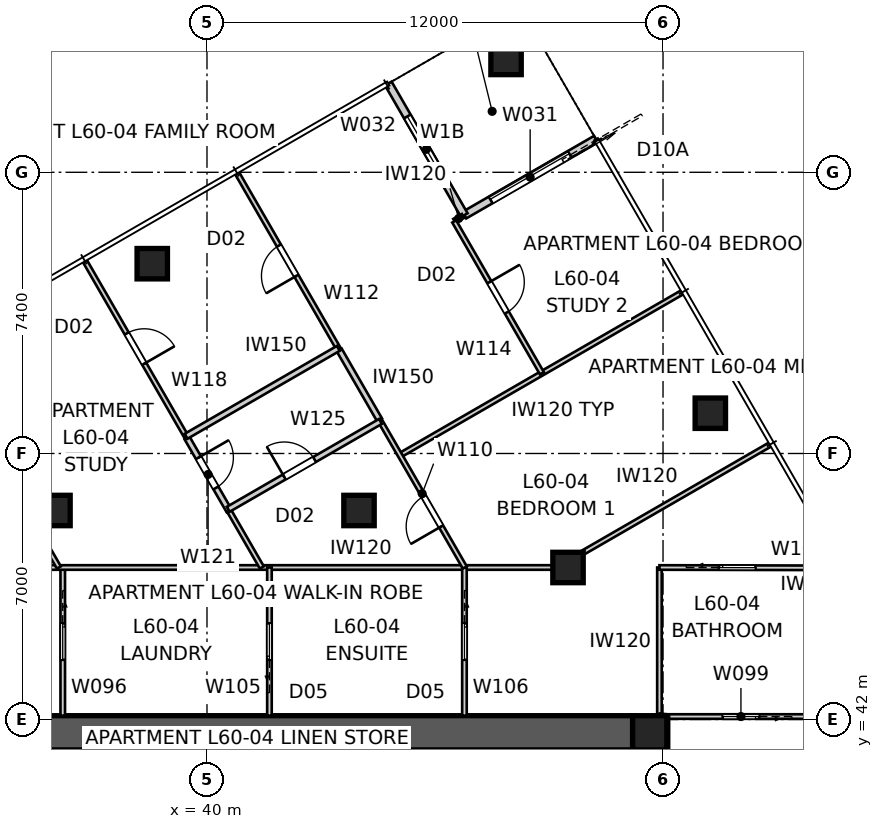
"""IFC4 building model, lengths in metres.
Left out: names, types, materials, properties, quantities, classifications, styles, units other than length and angle.
Written with IfcOpenShell. Run it as: python <this file> out.ifc"""

import sys

from ifc_helpers import new_model, si_unit, direction, frame, frame_2d, origin, origin_2d, place, context, subcontext, project, spatial, polyline, rectangle, outline, extrude, element, fill, save


model = new_model("IFC4")
c1 = context("Model", 3, precision=1e-05, world=origin(), true_north=direction((0.0, 1.0)))
c2 = subcontext(c1, "Body", "Model", "MODEL_VIEW")
j1 = project(units=[si_unit("LENGTHUNIT", "METRE"), si_unit("PLANEANGLEUNIT", "RADIAN")], contexts=[c1])
p1 = place(None, origin())
s1 = spatial("IfcSite", under=j1, at=p1, CompositionType="ELEMENT")
p2 = place(p1, origin())
s2 = spatial("IfcBuilding", under=s1, at=p2, CompositionType="ELEMENT")
p3 = place(p2, frame((0.0, 0.0, 218.4)))
s3 = spatial("IfcBuildingStorey", under=s2, at=p3, CompositionType="ELEMENT", Elevation=218.4)
p4 = place(p3, frame((28.8, 41.65, 0.0), z_axis=(0.0, 0.0, 1.0), x_axis=(1.0, 0.0, 0.0)))
e1 = element("IfcWall", 1, at=p4, inside=s3, PredefinedType="SHEAR", context=c2, shape_type="SweptSolid", body=[
    extrude(outline(polyline([(0.0, -0.45), (22.4, -0.45), (22.4, -0.025), (22.85, -0.025), (22.85, 0.025), (22.4, 0.025), (22.4, 0.45), (0.0, 0.45), (0.0, 0.025), (-0.45, 0.025), (-0.45, -0.025), (0.0, -0.025), (0.0, -0.45)])), origin(), (0.0, 0.0, 1.0), 3.4),
])
p5 = place(p3, frame((51.65, 18.8, 0.0), z_axis=(0.0, 0.0, 1.0), x_axis=(0.0, 1.0, 0.0)))
e2 = element("IfcWall", 2, at=p5, inside=s3, PredefinedType="SHEAR", context=c2, shape_type="SweptSolid", body=[
    extrude(outline(polyline([(0.0, -0.45), (22.4, -0.45), (22.4, -0.025), (22.85, -0.025), (22.85, 0.025), (22.4, 0.025), (22.4, 0.45), (0.0, 0.45), (0.0, 0.025), (-0.45, 0.025), (-0.45, -0.025), (0.0, -0.025), (0.0, -0.45)])), origin(), (0.0, 0.0, 1.0), 3.4),
])
p6 = place(p5, frame((11.14, 0.0, 0.0)))
e3 = element("IfcOpeningElement", 3, at=p6, cuts=e2, PredefinedType="OPENING", context=c2, shape_type="SweptSolid", body=[
    extrude(rectangle(XDim=1.02, YDim=2.4, at=frame_2d((0.51, 1.2))), frame((0.0, 0.46, 0.0), z_axis=(0.0, -1.0, 0.0), x_axis=(1.0, 0.0, 0.0)), (0.0, 0.0, 1.0), 0.92),
])
p7 = place(p3, frame((51.65, 41.65, 0.0), z_axis=(0.0, 0.0, 1.0), x_axis=(1.0, 0.0, 0.0)))
e4 = element("IfcColumn", 4, at=p7, inside=s3, PredefinedType="COLUMN", context=c2, shape_type="SweptSolid", body=[
    extrude(rectangle(XDim=0.9, YDim=0.9, at=origin_2d()), origin(), (0.0, 0.0, 1.0), 3.4),
])
for number, where, z_axis, x_axis in (
    (5, (53.245, 50.06, 0.0), (0.0, 0.0, 1.0), (1.0, 0.0, 0.0)),
    (6, (47.87, 59.37, 0.0), (0.0, 0.0, 1.0), (1.0, 0.0, 0.0)),
    (7, (38.56, 53.995, 0.0), (0.0, 0.0, 1.0), (1.0, 0.0, 0.0)),
    (8, (49.5, 46.0, 0.0), (0.0, 0.0, 1.0), (1.0, 0.0, 0.0)),
    (9, (44.0, 47.5, 0.0), (0.0, 0.0, 1.0), (1.0, 0.0, 0.0)),
    (10, (36.0, 47.5, 0.0), (0.0, 0.0, 1.0), (1.0, 0.0, 0.0)),
):
    element("IfcColumn", number, at=place(p3, frame(where, z_axis=z_axis, x_axis=x_axis)), inside=s3, PredefinedType="COLUMN", context=c2, shape_type="SweptSolid", body=[
        extrude(rectangle(XDim=0.8, YDim=0.8, at=origin_2d()), origin(), (0.0, 0.0, 1.0), 3.4),
    ])
p8 = place(p3, frame((50.236, 57.271, 0.0), z_axis=(0.0, 0.0, 1.0), x_axis=(-0.866026010844, -0.49999894854, 0.0)))
e11 = element("IfcWall", 11, at=p8, inside=s3, PredefinedType="SOLIDWALL", context=c2, shape_type="SweptSolid", body=[
    extrude(rectangle(XDim=4.0, YDim=0.2, at=frame_2d((2.0, 0.0))), origin(), (0.0, 0.0, 1.0), 3.25),
])
p9 = place(p8, frame((0.8, 0.0, 0.0)))
e12 = element("IfcOpeningElement", 12, at=p9, cuts=e11, PredefinedType="OPENING", context=c2, shape_type="SweptSolid", body=[
    extrude(rectangle(XDim=2.4, YDim=2.1, at=frame_2d((1.2, 1.05))), frame((0.0, 0.11, 0.0), z_axis=(0.0, -1.0, 0.0), x_axis=(1.0, 0.0, 0.0)), (0.0, 0.0, 1.0), 0.22),
])
p10 = place(p3, frame((46.771, 55.271, 0.0), z_axis=(0.0, 0.0, 1.0), x_axis=(-0.49999894854, 0.866026010844, 0.0)))
e13 = element("IfcWall", 13, at=p10, inside=s3, PredefinedType="SOLIDWALL", context=c2, shape_type="SweptSolid", body=[
    extrude(rectangle(XDim=4.0, YDim=0.2, at=frame_2d((2.0, 0.0))), origin(), (0.0, 0.0, 1.0), 3.25),
])
p11 = place(p10, frame((1.0, 0.0, 0.45)))
e14 = element("IfcOpeningElement", 14, at=p11, cuts=e13, PredefinedType="OPENING", context=c2, shape_type="SweptSolid", body=[
    extrude(rectangle(XDim=2.0, YDim=1.8, at=frame_2d((1.0, 0.9))), frame((0.0, 0.11, 0.0), z_axis=(0.0, -1.0, 0.0), x_axis=(1.0, 0.0, 0.0)), (0.0, 0.0, 1.0), 0.22),
])
p12 = place(p3, frame((59.486, 41.25, 0.0), z_axis=(0.0, 0.0, 1.0), x_axis=(-0.866020489494, -0.500008511703, 0.0)))
e15 = element("IfcWall", 15, at=p12, inside=s3, PredefinedType="PARTITIONING", context=c2, shape_type="SweptSolid", body=[
    extrude(rectangle(XDim=8.496, YDim=0.25, at=frame_2d((4.248, 0.0))), origin(), (0.0, 0.0, 1.0), 3.25),
])
p13 = place(p3, frame((36.204, 46.0, 0.0), z_axis=(0.0, 0.0, 1.0), x_axis=(0.0, -1.0, 0.0)))
e16 = element("IfcWall", 16, at=p13, inside=s3, PredefinedType="PARTITIONING", context=c2, shape_type="SweptSolid", body=[
    extrude(rectangle(XDim=3.9, YDim=0.12, at=frame_2d((1.95, 0.0))), origin(), (0.0, 0.0, 1.0), 3.25),
])
p14 = place(p13, frame((1.47, 0.0, 0.0)))
e17 = element("IfcOpeningElement", 17, at=p14, cuts=e16, PredefinedType="OPENING", context=c2, shape_type="SweptSolid", body=[
    extrude(rectangle(XDim=0.96, YDim=2.1, at=frame_2d((0.48, 1.05))), frame((0.0, 0.07, 0.0), z_axis=(0.0, -1.0, 0.0), x_axis=(1.0, 0.0, 0.0)), (0.0, 0.0, 1.0), 0.14),
])
p15 = place(p3, frame((32.0, 46.0, 0.0), z_axis=(0.0, 0.0, 1.0), x_axis=(1.0, 0.0, 0.0)))
e18 = element("IfcWall", 18, at=p15, inside=s3, PredefinedType="PARTITIONING", context=c2, shape_type="SweptSolid", body=[
    extrude(rectangle(XDim=17.213, YDim=0.12, at=frame_2d((8.607, 0.0))), origin(), (0.0, 0.0, 1.0), 3.25),
])
p16 = place(p3, frame((56.0, 42.078, 0.0), z_axis=(0.0, 0.0, 1.0), x_axis=(-1.0, 0.0, 0.0)))
e19 = element("IfcWall", 19, at=p16, inside=s3, PredefinedType="PARTITIONING", context=c2, shape_type="SweptSolid", body=[
    extrude(rectangle(XDim=3.9, YDim=0.12, at=frame_2d((1.95, 0.0))), origin(), (0.0, 0.0, 1.0), 3.25),
])
p17 = place(p16, frame((1.47, 0.0, 0.0)))
e20 = element("IfcOpeningElement", 20, at=p17, cuts=e19, PredefinedType="OPENING", context=c2, shape_type="SweptSolid", body=[
    extrude(rectangle(XDim=0.96, YDim=2.1, at=frame_2d((0.48, 1.05))), frame((0.0, 0.07, 0.0), z_axis=(0.0, -1.0, 0.0), x_axis=(1.0, 0.0, 0.0)), (0.0, 0.0, 1.0), 0.14),
])
p18 = place(p3, frame((51.906, 42.1, 0.0), z_axis=(0.0, 0.0, 1.0), x_axis=(0.0, 1.0, 0.0)))
e21 = element("IfcWall", 21, at=p18, inside=s3, PredefinedType="PARTITIONING", context=c2, shape_type="SweptSolid", body=[
    extrude(rectangle(XDim=3.9, YDim=0.12, at=frame_2d((1.95, 0.0))), origin(), (0.0, 0.0, 1.0), 3.25),
])
p19 = place(p3, frame((51.906, 46.0, 0.0), z_axis=(0.0, 0.0, 1.0), x_axis=(0.999997822794, -0.002086721841, 0.0)))
e22 = element("IfcWall", 22, at=p19, inside=s3, PredefinedType="PARTITIONING", context=c2, shape_type="SweptSolid", body=[
    extrude(rectangle(XDim=4.797, YDim=0.12, at=frame_2d((2.398, 0.0))), origin(), (0.0, 0.0, 1.0), 3.25),
])
p20 = place(p19, frame((1.567, 0.0, 0.0)))
e23 = element("IfcOpeningElement", 23, at=p20, cuts=e22, PredefinedType="OPENING", context=c2, shape_type="SweptSolid", body=[
    extrude(rectangle(XDim=0.96, YDim=2.1, at=frame_2d((0.48, 1.05))), frame((0.0, 0.07, 0.0), z_axis=(0.0, -1.0, 0.0), x_axis=(1.0, 0.0, 0.0)), (0.0, 0.0, 1.0), 0.14),
])
p21 = place(p3, frame((52.1, 41.18, 0.0), z_axis=(0.0, 0.0, 1.0), x_axis=(0.0, 1.0, 0.0)))
e24 = element("IfcWall", 24, at=p21, inside=s3, PredefinedType="PARTITIONING", context=c2, shape_type="SweptSolid", body=[
    extrude(rectangle(XDim=0.898, YDim=0.12, at=frame_2d((0.449, 0.0))), origin(), (0.0, 0.0, 1.0), 3.25),
])
p22 = place(p3, frame((41.644, 42.1, 0.0), z_axis=(0.0, 0.0, 1.0), x_axis=(0.0, 1.0, 0.0)))
e25 = element("IfcWall", 25, at=p22, inside=s3, PredefinedType="PARTITIONING", context=c2, shape_type="SweptSolid", body=[
    extrude(rectangle(XDim=3.9, YDim=0.12, at=frame_2d((1.95, 0.0))), origin(), (0.0, 0.0, 1.0), 3.25),
])
p23 = place(p22, frame((1.47, 0.0, 0.0)))
e26 = element("IfcOpeningElement", 26, at=p23, cuts=e25, PredefinedType="OPENING", context=c2, shape_type="SweptSolid", body=[
    extrude(rectangle(XDim=0.96, YDim=2.1, at=frame_2d((0.48, 1.05))), frame((0.0, 0.07, 0.0), z_axis=(0.0, -1.0, 0.0), x_axis=(1.0, 0.0, 0.0)), (0.0, 0.0, 1.0), 0.14),
])
p24 = place(p3, frame((46.775, 46.0, 0.0), z_axis=(0.0, 0.0, 1.0), x_axis=(0.0, -1.0, 0.0)))
e27 = element("IfcWall", 27, at=p24, inside=s3, PredefinedType="PARTITIONING", context=c2, shape_type="SweptSolid", body=[
    extrude(rectangle(XDim=3.9, YDim=0.12, at=frame_2d((1.95, 0.0))), origin(), (0.0, 0.0, 1.0), 3.25),
])
p25 = place(p24, frame((1.47, 0.0, 0.0)))
e28 = element("IfcOpeningElement", 28, at=p25, cuts=e27, PredefinedType="OPENING", context=c2, shape_type="SweptSolid", body=[
    extrude(rectangle(XDim=0.96, YDim=2.1, at=frame_2d((0.48, 1.05))), frame((0.0, 0.07, 0.0), z_axis=(0.0, -1.0, 0.0), x_axis=(1.0, 0.0, 0.0)), (0.0, 0.0, 1.0), 0.14),
])
p26 = place(p3, frame((45.079, 48.954, 0.0), z_axis=(0.0, 0.0, 1.0), x_axis=(0.866025991751, 0.49999898161, 0.0)))
e29 = element("IfcWall", 29, at=p26, inside=s3, PredefinedType="PARTITIONING", context=c2, shape_type="SweptSolid", body=[
    extrude(rectangle(XDim=8.585, YDim=0.12, at=frame_2d((4.292, 0.0))), origin(), (0.0, 0.0, 1.0), 3.25),
])
p27 = place(p3, frame((46.784, 46.0, 0.0), z_axis=(0.0, 0.0, 1.0), x_axis=(-0.500017500808, 0.866015299452, 0.0)))
e30 = element("IfcWall", 30, at=p27, inside=s3, PredefinedType="PARTITIONING", context=c2, shape_type="SweptSolid", body=[
    extrude(rectangle(XDim=4.489, YDim=0.12, at=frame_2d((2.244, 0.0))), origin(), (0.0, 0.0, 1.0), 3.25),
])
p28 = place(p27, frame((1.245, 0.0, 0.0)))
e31 = element("IfcOpeningElement", 31, at=p28, cuts=e30, PredefinedType="OPENING", context=c2, shape_type="SweptSolid", body=[
    extrude(rectangle(XDim=0.92, YDim=2.34, at=frame_2d((0.46, 1.17))), frame((0.0, 0.07, 0.0), z_axis=(0.0, -1.0, 0.0), x_axis=(1.0, 0.0, 0.0)), (0.0, 0.0, 1.0), 0.14),
])
p29 = place(p3, frame((54.826, 49.241, 0.0), z_axis=(0.0, 0.0, 1.0), x_axis=(-0.866023120914, -0.500003954026, 0.0)))
e32 = element("IfcWall", 32, at=p29, inside=s3, PredefinedType="PARTITIONING", context=c2, shape_type="SweptSolid", body=[
    extrude(rectangle(XDim=6.481, YDim=0.12, at=frame_2d((3.241, 0.0))), origin(), (0.0, 0.0, 1.0), 3.25),
])
p30 = place(p3, frame((43.48, 51.722, 0.0), z_axis=(0.0, 0.0, 1.0), x_axis=(-0.499989180974, 0.866031650062, 0.0)))
e33 = element("IfcWall", 33, at=p30, inside=s3, PredefinedType="PARTITIONING", context=c2, shape_type="SweptSolid", body=[
    extrude(rectangle(XDim=5.388, YDim=0.12, at=frame_2d((2.694, 0.0))), origin(), (0.0, 0.0, 1.0), 3.25),
])
p31 = place(p30, frame((2.254, 0.0, 0.0)))
e34 = element("IfcOpeningElement", 34, at=p31, cuts=e33, PredefinedType="OPENING", context=c2, shape_type="SweptSolid", body=[
    extrude(rectangle(XDim=0.92, YDim=2.34, at=frame_2d((0.46, 1.17))), frame((0.0, 0.07, 0.0), z_axis=(0.0, -1.0, 0.0), x_axis=(1.0, 0.0, 0.0)), (0.0, 0.0, 1.0), 0.14),
])
p32 = place(p3, frame((46.737, 55.251, 0.0), z_axis=(0.0, 0.0, 1.0), x_axis=(-0.865829262097, -0.500339573586, 0.0)))
e35 = element("IfcWall", 35, at=p32, inside=s3, PredefinedType="PARTITIONING", context=c2, shape_type="SweptSolid", body=[
    extrude(rectangle(XDim=0.262, YDim=0.12, at=frame_2d((0.131, 0.0))), origin(), (0.0, 0.0, 1.0), 3.25),
])
p33 = place(p3, frame((46.506, 55.107, 0.0), z_axis=(0.0, 0.0, 1.0), x_axis=(0.49996820914, -0.866043757468, 0.0)))
e36 = element("IfcWall", 36, at=p33, inside=s3, PredefinedType="PARTITIONING", context=c2, shape_type="SweptSolid", body=[
    extrude(rectangle(XDim=4.615, YDim=0.12, at=frame_2d((2.308, 0.0))), origin(), (0.0, 0.0, 1.0), 3.25),
])
p34 = place(p33, frame((1.847, 0.0, 0.0)))
e37 = element("IfcOpeningElement", 37, at=p34, cuts=e36, PredefinedType="OPENING", context=c2, shape_type="SweptSolid", body=[
    extrude(rectangle(XDim=0.92, YDim=2.34, at=frame_2d((0.46, 1.17))), frame((0.0, 0.07, 0.0), z_axis=(0.0, -1.0, 0.0), x_axis=(1.0, 0.0, 0.0)), (0.0, 0.0, 1.0), 0.14),
])
p35 = place(p3, frame((44.54, 49.887, 0.0), z_axis=(0.0, 0.0, 1.0), x_axis=(-0.500005013853, 0.866022509016, 0.0)))
e38 = element("IfcWall", 38, at=p35, inside=s3, PredefinedType="SOLIDWALL", context=c2, shape_type="SweptSolid", body=[
    extrude(rectangle(XDim=2.119, YDim=0.15, at=frame_2d((1.06, 0.0))), origin(), (0.0, 0.0, 1.0), 3.25),
])
p36 = place(p3, frame((36.781, 54.076, 0.0), z_axis=(0.0, 0.0, 1.0), x_axis=(0.499989180974, -0.866031650062, 0.0)))
e39 = element("IfcWall", 39, at=p36, inside=s3, PredefinedType="PARTITIONING", context=c2, shape_type="SweptSolid", body=[
    extrude(rectangle(XDim=5.388, YDim=0.12, at=frame_2d((2.694, 0.0))), origin(), (0.0, 0.0, 1.0), 3.25),
])
p37 = place(p36, frame((2.214, 0.0, 0.0)))
e40 = element("IfcOpeningElement", 40, at=p37, cuts=e39, PredefinedType="OPENING", context=c2, shape_type="SweptSolid", body=[
    extrude(rectangle(XDim=0.92, YDim=2.34, at=frame_2d((0.46, 1.17))), frame((0.0, 0.07, 0.0), z_axis=(0.0, -1.0, 0.0), x_axis=(1.0, 0.0, 0.0)), (0.0, 0.0, 1.0), 0.14),
])
p38 = place(p3, frame((36.103, 46.0, 0.0), z_axis=(0.0, 0.0, 1.0), x_axis=(-0.500013541994, 0.866017585169, 0.0)))
e41 = element("IfcWall", 41, at=p38, inside=s3, PredefinedType="PARTITIONING", context=c2, shape_type="SweptSolid", body=[
    extrude(rectangle(XDim=6.655, YDim=0.12, at=frame_2d((3.328, 0.0))), origin(), (0.0, 0.0, 1.0), 3.25),
])
p39 = place(p38, frame((2.887, 0.0, 0.0)))
e42 = element("IfcOpeningElement", 42, at=p39, cuts=e41, PredefinedType="OPENING", context=c2, shape_type="SweptSolid", body=[
    extrude(rectangle(XDim=0.92, YDim=2.34, at=frame_2d((0.46, 1.17))), frame((0.0, 0.07, 0.0), z_axis=(0.0, -1.0, 0.0), x_axis=(1.0, 0.0, 0.0)), (0.0, 0.0, 1.0), 0.14),
])
p40 = place(p3, frame((40.584, 47.488, 0.0), z_axis=(0.0, 0.0, 1.0), x_axis=(0.500005339912, -0.866022320763, 0.0)))
e43 = element("IfcWall", 43, at=p40, inside=s3, PredefinedType="PARTITIONING", context=c2, shape_type="SweptSolid", body=[
    extrude(rectangle(XDim=1.718, YDim=0.12, at=frame_2d((0.859, 0.0))), origin(), (0.0, 0.0, 1.0), 3.25),
])
p41 = place(p3, frame((39.475, 49.41, 0.0), z_axis=(0.0, 0.0, 1.0), x_axis=(0.500008142102, -0.866020702889, 0.0)))
e44 = element("IfcWall", 44, at=p41, inside=s3, PredefinedType="SOLIDWALL", context=c2, shape_type="SweptSolid", body=[
    extrude(rectangle(XDim=2.219, YDim=0.15, at=frame_2d((1.11, 0.0))), origin(), (0.0, 0.0, 1.0), 3.25),
])
p42 = place(p41, frame((0.6, 0.0, 0.0)))
e45 = element("IfcOpeningElement", 45, at=p42, cuts=e44, PredefinedType="OPENING", context=c2, shape_type="SweptSolid", body=[
    extrude(rectangle(XDim=0.92, YDim=2.34, at=frame_2d((0.46, 1.17))), frame((0.0, 0.085, 0.0), z_axis=(0.0, -1.0, 0.0), x_axis=(1.0, 0.0, 0.0)), (0.0, 0.0, 1.0), 0.17),
])
p43 = place(p3, frame((43.455, 51.766, 0.0), z_axis=(0.0, 0.0, 1.0), x_axis=(-0.866025598446, -0.499999662836, 0.0)))
e46 = element("IfcWall", 46, at=p43, inside=s3, PredefinedType="SOLIDWALL", context=c2, shape_type="SweptSolid", body=[
    extrude(rectangle(XDim=4.625, YDim=0.15, at=frame_2d((2.312, 0.0))), origin(), (0.0, 0.0, 1.0), 3.25),
])
p44 = place(p3, frame((40.559, 47.531, 0.0), z_axis=(0.0, 0.0, 1.0), x_axis=(0.866025598446, 0.499999662836, 0.0)))
e47 = element("IfcWall", 47, at=p44, inside=s3, PredefinedType="SOLIDWALL", context=c2, shape_type="SweptSolid", body=[
    extrude(rectangle(XDim=4.625, YDim=0.15, at=frame_2d((2.312, 0.0))), origin(), (0.0, 0.0, 1.0), 3.25),
])
p45 = place(p44, frame((1.702, 0.0, 0.0)))
e48 = element("IfcOpeningElement", 48, at=p45, cuts=e47, PredefinedType="OPENING", context=c2, shape_type="SweptSolid", body=[
    extrude(rectangle(XDim=0.92, YDim=2.34, at=frame_2d((0.46, 1.17))), frame((0.0, 0.085, 0.0), z_axis=(0.0, -1.0, 0.0), x_axis=(1.0, 0.0, 0.0)), (0.0, 0.0, 1.0), 0.17),
])
p46 = place(p3, frame((51.906, 42.1, 0.0), z_axis=(0.0, 0.0, 1.0), x_axis=(0.993387055489, -0.114813579278, 0.0)))
e49 = element("IfcWall", 49, at=p46, inside=s3, PredefinedType="PARTITIONING", context=c2, shape_type="SweptSolid", body=[
    extrude(rectangle(XDim=0.196, YDim=0.12, at=frame_2d((0.098, 0.0))), origin(), (0.0, 0.0, 1.0), 3.25),
])
p47 = place(p9, origin())
e50 = element("IfcDoor", 50, at=p47, inside=s3, OperationType="SLIDING_TO_LEFT", PredefinedType="DOOR", context=c2, shape_type="SweptSolid", body=[
    extrude(rectangle(XDim=2.4, YDim=2.1, at=frame_2d((1.2, 1.05))), frame((0.0, 0.025, 0.0), z_axis=(0.0, -1.0, 0.0), x_axis=(1.0, 0.0, 0.0)), (0.0, 0.0, 1.0), 0.05),
])
fill(e12, e50)
p48 = place(p11, origin())
e51 = element("IfcWindow", 51, at=p48, inside=s3, PartitioningType="SINGLE_PANEL", PredefinedType="WINDOW", context=c2, shape_type="SweptSolid", body=[
    extrude(rectangle(XDim=2.0, YDim=1.8, at=frame_2d((1.0, 0.9))), frame((0.0, 0.03, 0.0), z_axis=(0.0, -1.0, 0.0), x_axis=(1.0, 0.0, 0.0)), (0.0, 0.0, 1.0), 0.06),
])
fill(e14, e51)
p49 = place(p14, origin())
e52 = element("IfcDoor", 52, at=p49, inside=s3, OperationType="SLIDING_TO_LEFT", PredefinedType="DOOR", context=c2, shape_type="SweptSolid", body=[
    extrude(rectangle(XDim=0.96, YDim=2.1, at=frame_2d((0.48, 1.05))), frame((0.0, 0.025, 0.0), z_axis=(0.0, -1.0, 0.0), x_axis=(1.0, 0.0, 0.0)), (0.0, 0.0, 1.0), 0.05),
])
fill(e17, e52)
p50 = place(p37, origin())
e53 = element("IfcDoor", 53, at=p50, inside=s3, OperationType="SINGLE_SWING_RIGHT", PredefinedType="DOOR", context=c2, shape_type="SweptSolid", body=[
    extrude(rectangle(XDim=0.92, YDim=2.34, at=frame_2d((0.46, 1.17))), frame((0.0, 0.025, 0.0), z_axis=(0.0, -1.0, 0.0), x_axis=(1.0, 0.0, 0.0)), (0.0, 0.0, 1.0), 0.05),
])
fill(e40, e53)
p51 = place(p42, origin())
e54 = element("IfcDoor", 54, at=p51, inside=s3, OperationType="SINGLE_SWING_LEFT", PredefinedType="DOOR", context=c2, shape_type="SweptSolid", body=[
    extrude(rectangle(XDim=0.92, YDim=2.34, at=frame_2d((0.46, 1.17))), frame((0.0, 0.025, 0.0), z_axis=(0.0, -1.0, 0.0), x_axis=(1.0, 0.0, 0.0)), (0.0, 0.0, 1.0), 0.05),
])
fill(e45, e54)
p52 = place(p23, origin())
e55 = element("IfcDoor", 55, at=p52, inside=s3, OperationType="SLIDING_TO_LEFT", PredefinedType="DOOR", context=c2, shape_type="SweptSolid", body=[
    extrude(rectangle(XDim=0.96, YDim=2.1, at=frame_2d((0.48, 1.05))), frame((0.0, 0.025, 0.0), z_axis=(0.0, -1.0, 0.0), x_axis=(1.0, 0.0, 0.0)), (0.0, 0.0, 1.0), 0.05),
])
fill(e26, e55)
p53 = place(p31, origin())
e56 = element("IfcDoor", 56, at=p53, inside=s3, OperationType="SINGLE_SWING_LEFT", PredefinedType="DOOR", context=c2, shape_type="SweptSolid", body=[
    extrude(rectangle(XDim=0.92, YDim=2.34, at=frame_2d((0.46, 1.17))), frame((0.0, 0.025, 0.0), z_axis=(0.0, -1.0, 0.0), x_axis=(1.0, 0.0, 0.0)), (0.0, 0.0, 1.0), 0.05),
])
fill(e34, e56)
p54 = place(p45, origin())
e57 = element("IfcDoor", 57, at=p54, inside=s3, OperationType="SINGLE_SWING_LEFT", PredefinedType="DOOR", context=c2, shape_type="SweptSolid", body=[
    extrude(rectangle(XDim=0.92, YDim=2.34, at=frame_2d((0.46, 1.17))), frame((0.0, 0.025, 0.0), z_axis=(0.0, -1.0, 0.0), x_axis=(1.0, 0.0, 0.0)), (0.0, 0.0, 1.0), 0.05),
])
fill(e48, e57)
p55 = place(p25, origin())
e58 = element("IfcDoor", 58, at=p55, inside=s3, OperationType="SLIDING_TO_LEFT", PredefinedType="DOOR", context=c2, shape_type="SweptSolid", body=[
    extrude(rectangle(XDim=0.96, YDim=2.1, at=frame_2d((0.48, 1.05))), frame((0.0, 0.025, 0.0), z_axis=(0.0, -1.0, 0.0), x_axis=(1.0, 0.0, 0.0)), (0.0, 0.0, 1.0), 0.05),
])
fill(e28, e58)
p56 = place(p28, origin())
e59 = element("IfcDoor", 59, at=p56, inside=s3, OperationType="SINGLE_SWING_LEFT", PredefinedType="DOOR", context=c2, shape_type="SweptSolid", body=[
    extrude(rectangle(XDim=0.92, YDim=2.34, at=frame_2d((0.46, 1.17))), frame((0.0, 0.025, 0.0), z_axis=(0.0, -1.0, 0.0), x_axis=(1.0, 0.0, 0.0)), (0.0, 0.0, 1.0), 0.05),
])
fill(e31, e59)
p57 = place(p20, origin())
e60 = element("IfcDoor", 60, at=p57, inside=s3, OperationType="SLIDING_TO_LEFT", PredefinedType="DOOR", context=c2, shape_type="SweptSolid", body=[
    extrude(rectangle(XDim=0.96, YDim=2.1, at=frame_2d((0.48, 1.05))), frame((0.0, 0.025, 0.0), z_axis=(0.0, -1.0, 0.0), x_axis=(1.0, 0.0, 0.0)), (0.0, 0.0, 1.0), 0.05),
])
fill(e23, e60)
p58 = place(p17, origin())
e61 = element("IfcDoor", 61, at=p58, inside=s3, OperationType="SLIDING_TO_LEFT", PredefinedType="DOOR", context=c2, shape_type="SweptSolid", body=[
    extrude(rectangle(XDim=0.96, YDim=2.1, at=frame_2d((0.48, 1.05))), frame((0.0, 0.025, 0.0), z_axis=(0.0, -1.0, 0.0), x_axis=(1.0, 0.0, 0.0)), (0.0, 0.0, 1.0), 0.05),
])
fill(e20, e61)
p59 = place(p34, origin())
e62 = element("IfcDoor", 62, at=p59, inside=s3, OperationType="SINGLE_SWING_LEFT", PredefinedType="DOOR", context=c2, shape_type="SweptSolid", body=[
    extrude(rectangle(XDim=0.92, YDim=2.34, at=frame_2d((0.46, 1.17))), frame((0.0, 0.025, 0.0), z_axis=(0.0, -1.0, 0.0), x_axis=(1.0, 0.0, 0.0)), (0.0, 0.0, 1.0), 0.05),
])
fill(e37, e62)
save(model, sys.argv[1])
